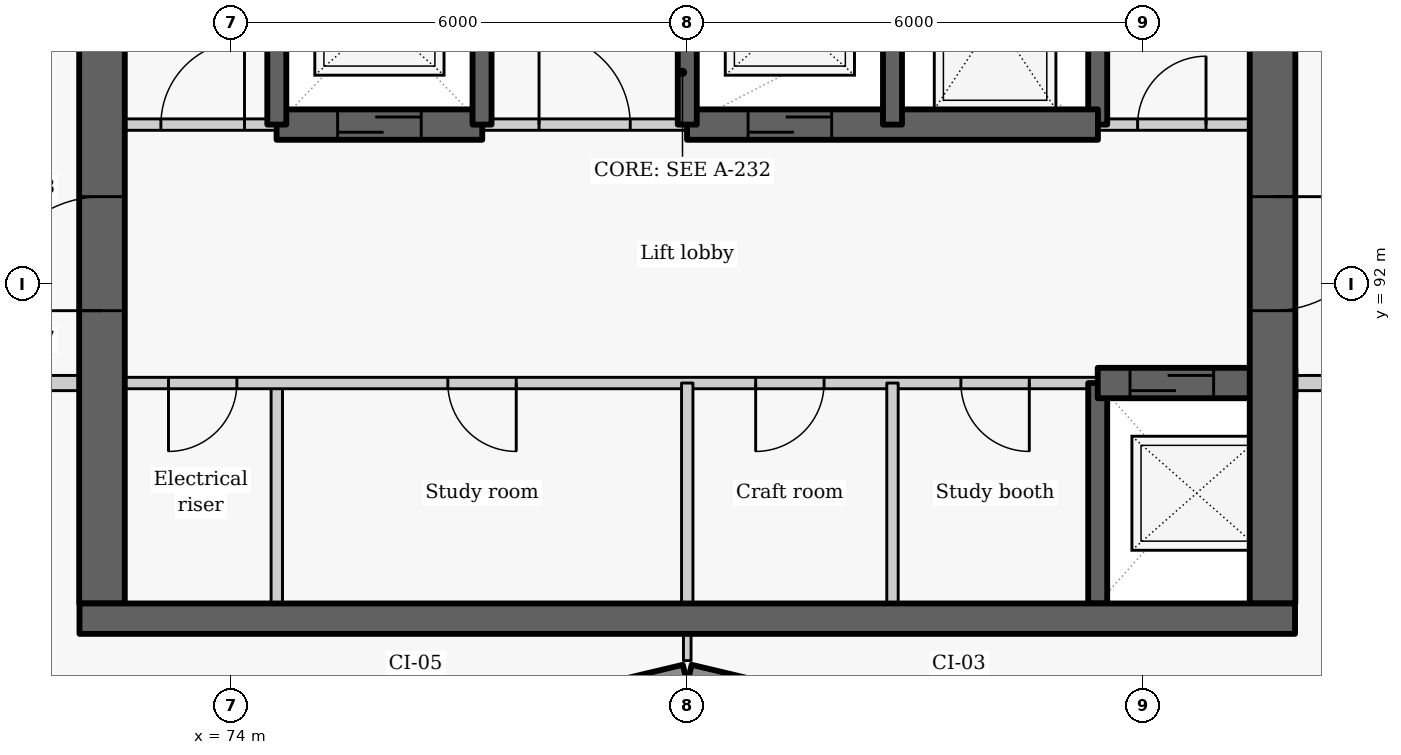
"""IFC4 building model, lengths in metres.
Left out: names, types, materials, properties, quantities, classifications, styles, units other than length and angle.
Written with IfcOpenShell. Run it as: python <this file> out.ifc"""

import sys

from ifc_helpers import new_model, si_unit, direction, frame, frame_2d, origin, place, context, subcontext, project, spatial, rectangle, extrude, element, fill, save


model = new_model("IFC4")
c1 = context("Model", 3, precision=1e-05, world=origin(), true_north=direction((0.0, 1.0)))
c2 = subcontext(c1, "Body", "Model", "MODEL_VIEW")
j1 = project(units=[si_unit("LENGTHUNIT", "METRE"), si_unit("PLANEANGLEUNIT", "RADIAN")], contexts=[c1])
p1 = place(None, origin())
s1 = spatial("IfcSite", under=j1, at=p1, CompositionType="ELEMENT")
p2 = place(p1, origin())
s2 = spatial("IfcBuilding", under=s1, at=p2, CompositionType="ELEMENT")
p3 = place(p2, frame((0.0, 0.0, 180.0)))
s3 = spatial("IfcBuildingStorey", under=s2, at=p3, CompositionType="ELEMENT", Elevation=180.0)
p4 = place(p3, frame((76.814, 86.119, 0.0), z_axis=(0.0, 0.0, 1.0), x_axis=(0.972773113459, 0.231759508395, 0.0)))
e1 = element("IfcWall", 1, at=p4, inside=s3, PredefinedType="SOLIDWALL", context=c2, shape_type="SweptSolid", body=[
    extrude(rectangle(XDim=3.246, YDim=0.25, at=frame_2d((1.623, 0.0))), origin(), (0.0, 0.0, 1.0), 2.425),
])
p5 = place(p4, frame((0.573, 0.0, 0.9)))
e2 = element("IfcOpeningElement", 2, at=p5, cuts=e1, PredefinedType="OPENING", context=c2, shape_type="SweptSolid", body=[
    extrude(rectangle(XDim=2.1, YDim=1.1, at=frame_2d((1.05, 0.55))), frame((0.0, 0.135, 0.0), z_axis=(0.0, -1.0, 0.0), x_axis=(1.0, 0.0, 0.0)), (0.0, 0.0, 1.0), 0.27),
])
p6 = place(p3, frame((80.029, 86.872, 0.0), z_axis=(0.0, 0.0, 1.0), x_axis=(0.972773113459, -0.231759508395, 0.0)))
e3 = element("IfcWall", 3, at=p6, inside=s3, PredefinedType="SOLIDWALL", context=c2, shape_type="SweptSolid", body=[
    extrude(rectangle(XDim=3.246, YDim=0.25, at=frame_2d((1.623, 0.0))), origin(), (0.0, 0.0, 1.0), 2.425),
])
p7 = place(p6, frame((0.573, 0.0, 0.9)))
e4 = element("IfcOpeningElement", 4, at=p7, cuts=e3, PredefinedType="OPENING", context=c2, shape_type="SweptSolid", body=[
    extrude(rectangle(XDim=2.1, YDim=1.1, at=frame_2d((1.05, 0.55))), frame((0.0, 0.135, 0.0), z_axis=(0.0, -1.0, 0.0), x_axis=(1.0, 0.0, 0.0)), (0.0, 0.0, 1.0), 0.27),
])
p8 = place(p3, frame((74.6, 87.8, 0.0), z_axis=(0.0, 0.0, 1.0), x_axis=(0.0, 1.0, 0.0)))
e5 = element("IfcWall", 5, at=p8, inside=s3, PredefinedType="PARTITIONING", context=c2, shape_type="SweptSolid", body=[
    extrude(rectangle(XDim=2.9, YDim=0.15, at=frame_2d((1.45, 0.0))), origin(), (0.0, 0.0, 1.0), 3.025),
])
p9 = place(p3, frame((85.4, 90.7, 0.0), z_axis=(0.0, 0.0, 1.0), x_axis=(-1.0, 0.0, 0.0)))
e6 = element("IfcWall", 6, at=p9, inside=s3, PredefinedType="PARTITIONING", context=c2, shape_type="SweptSolid", body=[
    extrude(rectangle(XDim=13.4, YDim=0.15, at=frame_2d((6.7, 0.0))), origin(), (0.0, 0.0, 1.0), 3.025),
])
p10 = place(p9, frame((11.325, 0.0, 0.0)))
e7 = element("IfcOpeningElement", 7, at=p10, cuts=e6, PredefinedType="OPENING", context=c2, shape_type="SweptSolid", body=[
    extrude(rectangle(XDim=0.9, YDim=2.1, at=frame_2d((0.45, 1.05))), frame((0.0, 0.085, 0.0), z_axis=(0.0, -1.0, 0.0), x_axis=(1.0, 0.0, 0.0)), (0.0, 0.0, 1.0), 0.17),
])
p11 = place(p9, frame((7.65, 0.0, 0.0)))
e8 = element("IfcOpeningElement", 8, at=p11, cuts=e6, PredefinedType="OPENING", context=c2, shape_type="SweptSolid", body=[
    extrude(rectangle(XDim=0.9, YDim=2.1, at=frame_2d((0.45, 1.05))), frame((0.0, 0.085, 0.0), z_axis=(0.0, -1.0, 0.0), x_axis=(1.0, 0.0, 0.0)), (0.0, 0.0, 1.0), 0.17),
])
p12 = place(p9, frame((3.6, 0.0, 0.0)))
e9 = element("IfcOpeningElement", 9, at=p12, cuts=e6, PredefinedType="OPENING", context=c2, shape_type="SweptSolid", body=[
    extrude(rectangle(XDim=0.9, YDim=2.1, at=frame_2d((0.45, 1.05))), frame((0.0, 0.085, 0.0), z_axis=(0.0, -1.0, 0.0), x_axis=(1.0, 0.0, 0.0)), (0.0, 0.0, 1.0), 0.17),
])
p13 = place(p9, frame((0.9, 0.0, 0.0)))
e10 = element("IfcOpeningElement", 10, at=p13, cuts=e6, PredefinedType="OPENING", context=c2, shape_type="SweptSolid", body=[
    extrude(rectangle(XDim=0.9, YDim=2.1, at=frame_2d((0.45, 1.05))), frame((0.0, 0.085, 0.0), z_axis=(0.0, -1.0, 0.0), x_axis=(1.0, 0.0, 0.0)), (0.0, 0.0, 1.0), 0.17),
])
p14 = place(p3, frame((72.3, 87.8, -0.275), z_axis=(0.0, 0.0, 1.0), x_axis=(0.0, 1.0, 0.0)))
e11 = element("IfcWall", 11, at=p14, inside=s3, PredefinedType="SHEAR", context=c2, shape_type="SweptSolid", body=[
    extrude(rectangle(XDim=9.1, YDim=0.6, at=frame_2d((4.55, 0.0))), origin(), (0.0, 0.0, 1.0), 3.3),
])
p15 = place(p14, frame((3.852, 0.0, 0.275)))
e12 = element("IfcOpeningElement", 12, at=p15, cuts=e11, PredefinedType="OPENING", context=c2, shape_type="SweptSolid", body=[
    extrude(rectangle(XDim=1.5, YDim=2.1, at=frame_2d((0.75, 1.05))), frame((0.0, 0.31, 0.0), z_axis=(0.0, -1.0, 0.0), x_axis=(1.0, 0.0, 0.0)), (0.0, 0.0, 1.0), 0.62),
])
p16 = place(p3, frame((85.4, 87.8, -0.275), z_axis=(0.0, 0.0, 1.0), x_axis=(0.0, 1.0, 0.0)))
e13 = element("IfcWall", 13, at=p16, inside=s3, PredefinedType="SHEAR", context=c2, shape_type="SweptSolid", body=[
    extrude(rectangle(XDim=2.9, YDim=0.25, at=frame_2d((1.45, 0.0))), origin(), (0.0, 0.0, 1.0), 3.3),
])
p17 = place(p3, frame((85.4, 94.1, -0.275), z_axis=(0.0, 0.0, 1.0), x_axis=(0.0, 1.0, 0.0)))
e14 = element("IfcWall", 14, at=p17, inside=s3, PredefinedType="SHEAR", context=c2, shape_type="SweptSolid", body=[
    extrude(rectangle(XDim=2.8, YDim=0.25, at=frame_2d((1.4, 0.0))), origin(), (0.0, 0.0, 1.0), 3.3),
])
p18 = place(p3, frame((85.4, 90.7, -0.275), z_axis=(0.0, 0.0, 1.0), x_axis=(1.0, 0.0, 0.0)))
e15 = element("IfcWall", 15, at=p18, inside=s3, PredefinedType="SHEAR", context=c2, shape_type="SweptSolid", body=[
    extrude(rectangle(XDim=2.6, YDim=0.4, at=frame_2d((1.3, 0.0))), origin(), (0.0, 0.0, 1.0), 3.3),
])
p19 = place(p18, frame((0.425, 0.0, 0.275)))
e16 = element("IfcOpeningElement", 16, at=p19, cuts=e15, PredefinedType="OPENING", context=c2, shape_type="SweptSolid", body=[
    extrude(rectangle(XDim=1.1, YDim=2.1, at=frame_2d((0.55, 1.05))), frame((0.0, 0.21, 0.0), z_axis=(0.0, -1.0, 0.0), x_axis=(1.0, 0.0, 0.0)), (0.0, 0.0, 1.0), 0.42),
])
p20 = place(p3, frame((87.7, 102.05, -0.275), z_axis=(0.0, 0.0, 1.0), x_axis=(0.0, -1.0, 0.0)))
e17 = element("IfcWall", 17, at=p20, inside=s3, PredefinedType="SHEAR", context=c2, shape_type="SweptSolid", body=[
    extrude(rectangle(XDim=14.25, YDim=0.6, at=frame_2d((7.125, 0.0))), origin(), (0.0, 0.0, 1.0), 3.3),
])
p21 = place(p20, frame((8.898, 0.0, 0.275)))
e18 = element("IfcOpeningElement", 18, at=p21, cuts=e17, PredefinedType="OPENING", context=c2, shape_type="SweptSolid", body=[
    extrude(rectangle(XDim=1.5, YDim=2.1, at=frame_2d((0.75, 1.05))), frame((0.0, 0.31, 0.0), z_axis=(0.0, -1.0, 0.0), x_axis=(1.0, 0.0, 0.0)), (0.0, 0.0, 1.0), 0.62),
])
for number, where, z_axis, x_axis in (
    (19, (80.0, 87.8, 0.0), (0.0, 0.0, 1.0), (0.0, 1.0, 0.0)),
    (20, (82.7, 87.8, 0.0), (0.0, 0.0, 1.0), (0.0, 1.0, 0.0)),
):
    element("IfcWall", number, at=place(p3, frame(where, z_axis=z_axis, x_axis=x_axis)), inside=s3, PredefinedType="PARTITIONING", context=c2, shape_type="SweptSolid", body=[
        extrude(rectangle(XDim=2.9, YDim=0.15, at=frame_2d((1.45, 0.0))), origin(), (0.0, 0.0, 1.0), 3.025),
    ])
p22 = place(p3, frame((72.0, 94.1, 0.0), z_axis=(0.0, 0.0, 1.0), x_axis=(1.0, 0.0, 0.0)))
e21 = element("IfcWall", 21, at=p22, inside=s3, PredefinedType="PARTITIONING", context=c2, shape_type="SweptSolid", body=[
    extrude(rectangle(XDim=2.603, YDim=0.15, at=frame_2d((1.302, 0.0))), origin(), (0.0, 0.0, 1.0), 3.025),
])
p23 = place(p22, frame((1.075, 0.0, 0.0)))
e22 = element("IfcOpeningElement", 22, at=p23, cuts=e21, PredefinedType="OPENING", context=c2, shape_type="SweptSolid", body=[
    extrude(rectangle(XDim=1.1, YDim=2.1, at=frame_2d((0.55, 1.05))), frame((0.0, 0.085, 0.0), z_axis=(0.0, -1.0, 0.0), x_axis=(1.0, 0.0, 0.0)), (0.0, 0.0, 1.0), 0.17),
])
p24 = place(p3, frame((77.297, 94.1, 0.0), z_axis=(0.0, 0.0, 1.0), x_axis=(1.0, 0.0, 0.0)))
e23 = element("IfcWall", 23, at=p24, inside=s3, PredefinedType="PARTITIONING", context=c2, shape_type="SweptSolid", body=[
    extrude(rectangle(XDim=2.706, YDim=0.15, at=frame_2d((1.353, 0.0))), origin(), (0.0, 0.0, 1.0), 3.025),
])
p25 = place(p24, frame((0.753, 0.0, 0.0)))
e24 = element("IfcOpeningElement", 24, at=p25, cuts=e23, PredefinedType="OPENING", context=c2, shape_type="SweptSolid", body=[
    extrude(rectangle(XDim=1.2, YDim=2.1, at=frame_2d((0.6, 1.05))), frame((0.0, 0.085, 0.0), z_axis=(0.0, -1.0, 0.0), x_axis=(1.0, 0.0, 0.0)), (0.0, 0.0, 1.0), 0.17),
])
p26 = place(p3, frame((85.397, 94.1, 0.0), z_axis=(0.0, 0.0, 1.0), x_axis=(1.0, 0.0, 0.0)))
e25 = element("IfcWall", 25, at=p26, inside=s3, PredefinedType="PARTITIONING", context=c2, shape_type="SweptSolid", body=[
    extrude(rectangle(XDim=2.603, YDim=0.15, at=frame_2d((1.302, 0.0))), origin(), (0.0, 0.0, 1.0), 3.025),
])
p27 = place(p26, frame((0.528, 0.0, 0.0)))
e26 = element("IfcOpeningElement", 26, at=p27, cuts=e25, PredefinedType="OPENING", context=c2, shape_type="SweptSolid", body=[
    extrude(rectangle(XDim=0.9, YDim=2.1, at=frame_2d((0.45, 1.05))), frame((0.0, 0.085, 0.0), z_axis=(0.0, -1.0, 0.0), x_axis=(1.0, 0.0, 0.0)), (0.0, 0.0, 1.0), 0.17),
])
p28 = place(p3, frame((74.597, 94.1, -0.275), z_axis=(0.0, 0.0, 1.0), x_axis=(1.0, 0.0, 0.0)))
e27 = element("IfcWall", 27, at=p28, inside=s3, PredefinedType="SHEAR", context=c2, shape_type="SweptSolid", body=[
    extrude(rectangle(XDim=2.706, YDim=0.4, at=frame_2d((1.353, 0.0))), origin(), (0.0, 0.0, 1.0), 3.3),
])
p29 = place(p28, frame((0.803, 0.0, 0.275)))
e28 = element("IfcOpeningElement", 28, at=p29, cuts=e27, PredefinedType="OPENING", context=c2, shape_type="SweptSolid", body=[
    extrude(rectangle(XDim=1.1, YDim=2.1, at=frame_2d((0.55, 1.05))), frame((0.0, 0.21, 0.0), z_axis=(0.0, -1.0, 0.0), x_axis=(1.0, 0.0, 0.0)), (0.0, 0.0, 1.0), 0.42),
])
p30 = place(p3, frame((79.997, 94.1, -0.275), z_axis=(0.0, 0.0, 1.0), x_axis=(1.0, 0.0, 0.0)))
e29 = element("IfcWall", 29, at=p30, inside=s3, PredefinedType="SHEAR", context=c2, shape_type="SweptSolid", body=[
    extrude(rectangle(XDim=5.406, YDim=0.4, at=frame_2d((2.703, 0.0))), origin(), (0.0, 0.0, 1.0), 3.3),
])
p31 = place(p30, frame((0.803, 0.0, 0.275)))
e30 = element("IfcOpeningElement", 30, at=p31, cuts=e29, PredefinedType="OPENING", context=c2, shape_type="SweptSolid", body=[
    extrude(rectangle(XDim=1.1, YDim=2.1, at=frame_2d((0.55, 1.05))), frame((0.0, 0.21, 0.0), z_axis=(0.0, -1.0, 0.0), x_axis=(1.0, 0.0, 0.0)), (0.0, 0.0, 1.0), 0.42),
])
for number, where, z_axis, x_axis in (
    (31, (74.6, 94.1, -0.275), (0.0, 0.0, 1.0), (0.0, 1.0, 0.0)),
    (32, (77.3, 94.1, -0.275), (0.0, 0.0, 1.0), (0.0, 1.0, 0.0)),
    (33, (80.0, 94.1, -0.275), (0.0, 0.0, 1.0), (0.0, 1.0, 0.0)),
    (34, (82.7, 94.1, -0.275), (0.0, 0.0, 1.0), (0.0, 1.0, 0.0)),
):
    element("IfcWall", number, at=place(p3, frame(where, z_axis=z_axis, x_axis=x_axis)), inside=s3, PredefinedType="SHEAR", context=c2, shape_type="SweptSolid", body=[
        extrude(rectangle(XDim=2.8, YDim=0.25, at=frame_2d((1.4, 0.0))), origin(), (0.0, 0.0, 1.0), 3.3),
    ])
for number, where, z_axis, x_axis in (
    (35, (70.45, 90.7, 0.0), (0.0, 0.0, 1.0), (1.0, 0.0, 0.0)),
    (36, (88.0, 90.7, 0.0), (0.0, 0.0, 1.0), (1.0, 0.0, 0.0)),
):
    element("IfcWall", number, at=place(p3, frame(where, z_axis=z_axis, x_axis=x_axis)), inside=s3, PredefinedType="PARTITIONING", context=c2, shape_type="SweptSolid", body=[
        extrude(rectangle(XDim=1.55, YDim=0.2, at=frame_2d((0.775, 0.0))), origin(), (0.0, 0.0, 1.0), 3.025),
    ])
p32 = place(p3, frame((80.0, 87.048, 0.0), z_axis=(0.0, 0.0, 1.0), x_axis=(0.0, 1.0, 0.0)))
e37 = element("IfcWall", 37, at=p32, inside=s3, PredefinedType="PARTITIONING", context=c2, shape_type="SweptSolid", body=[
    extrude(rectangle(XDim=0.352, YDim=0.1, at=frame_2d((0.176, 0.0))), origin(), (0.0, 0.0, 1.0), 3.025),
])
p33 = place(p3, frame((72.004, 87.6, -0.275), z_axis=(0.0, 0.0, 1.0), x_axis=(1.0, 0.0, 0.0)))
e38 = element("IfcWall", 38, at=p33, inside=s3, PredefinedType="SHEAR", context=c2, shape_type="SweptSolid", body=[
    extrude(rectangle(XDim=15.992, YDim=0.4, at=frame_2d((7.996, 0.0))), origin(), (0.0, 0.0, 1.0), 3.3),
])
p34 = place(p10, origin())
e39 = element("IfcDoor", 39, at=p34, inside=s3, OperationType="SINGLE_SWING_RIGHT", PredefinedType="DOOR", context=c2, shape_type="SweptSolid", body=[
    extrude(rectangle(XDim=0.9, YDim=2.1, at=frame_2d((0.45, 1.05))), frame((0.0, 0.025, 0.0), z_axis=(0.0, -1.0, 0.0), x_axis=(1.0, 0.0, 0.0)), (0.0, 0.0, 1.0), 0.05),
])
fill(e7, e39)
p35 = place(p19, origin())
e40 = element("IfcDoor", 40, at=p35, inside=s3, OperationType="SLIDING_TO_LEFT", PredefinedType="DOOR", context=c2, shape_type="SweptSolid", body=[
    extrude(rectangle(XDim=1.1, YDim=2.1, at=frame_2d((0.55, 1.05))), frame((0.0, 0.025, 0.0), z_axis=(0.0, -1.0, 0.0), x_axis=(1.0, 0.0, 0.0)), (0.0, 0.0, 1.0), 0.05),
])
fill(e16, e40)
p36 = place(p11, origin())
e41 = element("IfcDoor", 41, at=p36, inside=s3, OperationType="SINGLE_SWING_LEFT", PredefinedType="DOOR", context=c2, shape_type="SweptSolid", body=[
    extrude(rectangle(XDim=0.9, YDim=2.1, at=frame_2d((0.45, 1.05))), frame((0.0, 0.025, 0.0), z_axis=(0.0, -1.0, 0.0), x_axis=(1.0, 0.0, 0.0)), (0.0, 0.0, 1.0), 0.05),
])
fill(e8, e41)
p37 = place(p12, origin())
e42 = element("IfcDoor", 42, at=p37, inside=s3, OperationType="SINGLE_SWING_RIGHT", PredefinedType="DOOR", context=c2, shape_type="SweptSolid", body=[
    extrude(rectangle(XDim=0.9, YDim=2.1, at=frame_2d((0.45, 1.05))), frame((0.0, 0.025, 0.0), z_axis=(0.0, -1.0, 0.0), x_axis=(1.0, 0.0, 0.0)), (0.0, 0.0, 1.0), 0.05),
])
fill(e9, e42)
p38 = place(p13, origin())
e43 = element("IfcDoor", 43, at=p38, inside=s3, OperationType="SINGLE_SWING_LEFT", PredefinedType="DOOR", context=c2, shape_type="SweptSolid", body=[
    extrude(rectangle(XDim=0.9, YDim=2.1, at=frame_2d((0.45, 1.05))), frame((0.0, 0.025, 0.0), z_axis=(0.0, -1.0, 0.0), x_axis=(1.0, 0.0, 0.0)), (0.0, 0.0, 1.0), 0.05),
])
fill(e10, e43)
p39 = place(p23, origin())
e44 = element("IfcDoor", 44, at=p39, inside=s3, OperationType="SINGLE_SWING_RIGHT", PredefinedType="DOOR", context=c2, shape_type="SweptSolid", body=[
    extrude(rectangle(XDim=1.1, YDim=2.1, at=frame_2d((0.55, 1.05))), frame((0.0, 0.025, 0.0), z_axis=(0.0, -1.0, 0.0), x_axis=(1.0, 0.0, 0.0)), (0.0, 0.0, 1.0), 0.05),
])
fill(e22, e44)
p40 = place(p29, origin())
e45 = element("IfcDoor", 45, at=p40, inside=s3, OperationType="SLIDING_TO_LEFT", PredefinedType="DOOR", context=c2, shape_type="SweptSolid", body=[
    extrude(rectangle(XDim=1.1, YDim=2.1, at=frame_2d((0.55, 1.05))), frame((0.0, 0.025, 0.0), z_axis=(0.0, -1.0, 0.0), x_axis=(1.0, 0.0, 0.0)), (0.0, 0.0, 1.0), 0.05),
])
fill(e28, e45)
p41 = place(p25, origin())
e46 = element("IfcDoor", 46, at=p41, inside=s3, OperationType="DOUBLE_DOOR_SINGLE_SWING", PredefinedType="DOOR", context=c2, shape_type="SweptSolid", body=[
    extrude(rectangle(XDim=1.2, YDim=2.1, at=frame_2d((0.6, 1.05))), frame((0.0, 0.025, 0.0), z_axis=(0.0, -1.0, 0.0), x_axis=(1.0, 0.0, 0.0)), (0.0, 0.0, 1.0), 0.05),
])
fill(e24, e46)
p42 = place(p31, origin())
e47 = element("IfcDoor", 47, at=p42, inside=s3, OperationType="SLIDING_TO_LEFT", PredefinedType="DOOR", context=c2, shape_type="SweptSolid", body=[
    extrude(rectangle(XDim=1.1, YDim=2.1, at=frame_2d((0.55, 1.05))), frame((0.0, 0.025, 0.0), z_axis=(0.0, -1.0, 0.0), x_axis=(1.0, 0.0, 0.0)), (0.0, 0.0, 1.0), 0.05),
])
fill(e30, e47)
p43 = place(p27, origin())
e48 = element("IfcDoor", 48, at=p43, inside=s3, OperationType="SINGLE_SWING_RIGHT", PredefinedType="DOOR", context=c2, shape_type="SweptSolid", body=[
    extrude(rectangle(XDim=0.9, YDim=2.1, at=frame_2d((0.45, 1.05))), frame((0.0, 0.025, 0.0), z_axis=(0.0, -1.0, 0.0), x_axis=(1.0, 0.0, 0.0)), (0.0, 0.0, 1.0), 0.05),
])
fill(e26, e48)
p44 = place(p21, origin())
e49 = element("IfcDoor", 49, at=p44, inside=s3, OperationType="DOUBLE_DOOR_SINGLE_SWING", PredefinedType="DOOR", context=c2, shape_type="SweptSolid", body=[
    extrude(rectangle(XDim=1.5, YDim=2.1, at=frame_2d((0.75, 1.05))), frame((0.0, 0.025, 0.0), z_axis=(0.0, -1.0, 0.0), x_axis=(1.0, 0.0, 0.0)), (0.0, 0.0, 1.0), 0.05),
])
fill(e18, e49)
p45 = place(p15, origin())
e50 = element("IfcDoor", 50, at=p45, inside=s3, OperationType="DOUBLE_DOOR_SINGLE_SWING", PredefinedType="DOOR", context=c2, shape_type="SweptSolid", body=[
    extrude(rectangle(XDim=1.5, YDim=2.1, at=frame_2d((0.75, 1.05))), frame((0.0, 0.025, 0.0), z_axis=(0.0, -1.0, 0.0), x_axis=(1.0, 0.0, 0.0)), (0.0, 0.0, 1.0), 0.05),
])
fill(e12, e50)
save(model, sys.argv[1])
